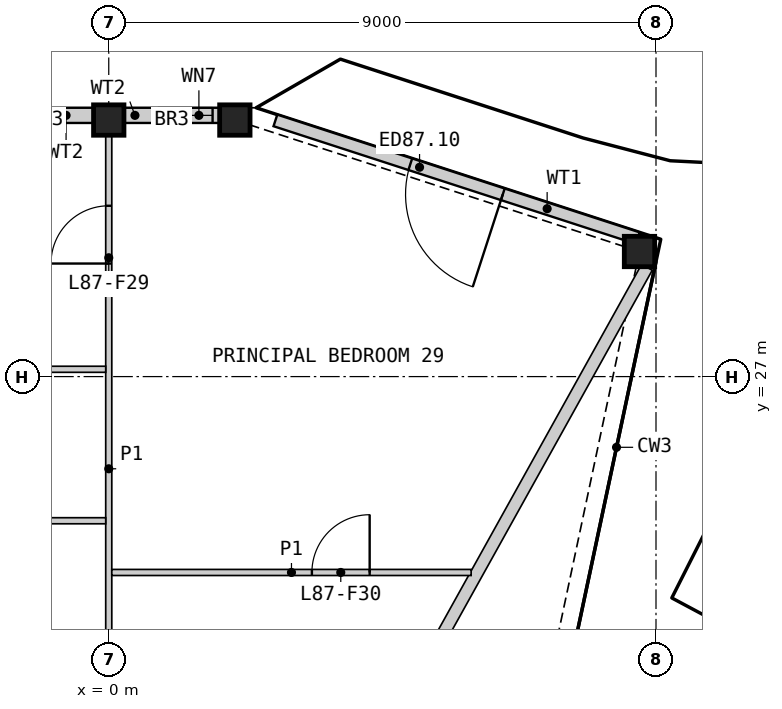
"""IFC4 building model, lengths in metres.
Left out: names, types, materials, properties, quantities, classifications, styles, units other than length and angle.
Written with IfcOpenShell. Run it as: python <this file> out.ifc"""

import sys

from ifc_helpers import new_model, si_unit, direction, frame, frame_2d, origin, origin_2d, place, context, subcontext, project, spatial, rectangle, hollow_rectangle, extrude, element, fill, save


model = new_model("IFC4")
c1 = context("Model", 3, precision=1e-05, world=origin(), true_north=direction((0.0, 1.0)))
c2 = subcontext(c1, "Body", "Model", "MODEL_VIEW")
j1 = project(units=[si_unit("LENGTHUNIT", "METRE"), si_unit("PLANEANGLEUNIT", "RADIAN")], contexts=[c1])
p1 = place(None, origin())
s1 = spatial("IfcSite", under=j1, at=p1, CompositionType="ELEMENT")
p2 = place(p1, origin())
s2 = spatial("IfcBuilding", under=s1, at=p2, CompositionType="ELEMENT")
p3 = place(p2, frame((0.0, 0.0, 384.8)))
s3 = spatial("IfcBuildingStorey", under=s2, at=p3, CompositionType="ELEMENT", Elevation=384.8)
for number, where, z_axis, x_axis in (
    (1, (8.729, 29.057, 0.0), (0.0, 0.0, 1.0), (1.0, 0.0, 0.0)),
    (2, (2.074, 31.219, 0.0), (0.0, 0.0, 1.0), (1.0, 0.0, 0.0)),
    (3, (0.0, 31.219, 0.0), (0.0, 0.0, 1.0), (1.0, 0.0, 0.0)),
):
    element("IfcColumn", number, at=place(p3, frame(where, z_axis=z_axis, x_axis=x_axis)), inside=s3, PredefinedType="COLUMN", context=c2, shape_type="SweptSolid", body=[
        extrude(hollow_rectangle(XDim=0.5, YDim=0.5, WallThickness=0.03, at=origin_2d()), origin(), (0.0, 0.0, 1.0), 3.4),
    ])
p4 = place(p3, frame((8.699, 29.277, 0.0), z_axis=(0.0, 0.0, 1.0), x_axis=(-0.951048671744, 0.309041136379, 0.0)))
e4 = element("IfcWall", 4, at=p4, inside=s3, PredefinedType="SOLIDWALL", context=c2, shape_type="SweptSolid", body=[
    extrude(rectangle(XDim=6.265, YDim=0.2, at=frame_2d((3.133, 0.0))), origin(), (0.0, 0.0, 1.0), 2.634),
])
p5 = place(p4, frame((2.333, 0.0, 0.0)))
e5 = element("IfcOpeningElement", 5, at=p5, cuts=e4, PredefinedType="OPENING", context=c2, shape_type="SweptSolid", body=[
    extrude(rectangle(XDim=1.6, YDim=2.25, at=frame_2d((0.8, 1.125))), frame((0.0, 0.11, 0.0), z_axis=(0.0, -1.0, 0.0), x_axis=(1.0, 0.0, 0.0)), (0.0, 0.0, 1.0), 0.22),
])
p6 = place(p3, frame((2.058, 31.296, 0.0), z_axis=(0.0, 0.0, 1.0), x_axis=(-1.0, 0.0, 0.0)))
e6 = element("IfcWall", 6, at=p6, inside=s3, PredefinedType="SOLIDWALL", context=c2, shape_type="SweptSolid", body=[
    extrude(rectangle(XDim=1.808, YDim=0.25, at=frame_2d((0.904, 0.0))), origin(), (0.0, 0.0, 1.0), 2.634),
])
p7 = place(p6, frame((0.35, 0.0, 1.8)))
e7 = element("IfcOpeningElement", 7, at=p7, cuts=e6, PredefinedType="OPENING", context=c2, shape_type="SweptSolid", body=[
    extrude(rectangle(XDim=0.9, YDim=0.6, at=frame_2d((0.45, 0.3))), frame((0.0, 0.135, 0.0), z_axis=(0.0, -1.0, 0.0), x_axis=(1.0, 0.0, 0.0)), (0.0, 0.0, 1.0), 0.27),
])
p8 = place(p3, frame((-0.25, 31.296, 0.0), z_axis=(0.0, 0.0, 1.0), x_axis=(-1.0, 0.0, 0.0)))
e8 = element("IfcWall", 8, at=p8, inside=s3, PredefinedType="SOLIDWALL", context=c2, shape_type="SweptSolid", body=[
    extrude(rectangle(XDim=1.808, YDim=0.25, at=frame_2d((0.904, 0.0))), origin(), (0.0, 0.0, 1.0), 2.634),
])
p9 = place(p3, frame((2.012, 16.498, 0.0), z_axis=(0.0, 0.0, 1.0), x_axis=(0.485991996179, 0.873963259897, 0.0)))
e9 = element("IfcWall", 9, at=p9, inside=s3, PredefinedType="PARTITIONING", context=c2, shape_type="SweptSolid", body=[
    extrude(rectangle(XDim=14.073, YDim=0.2, at=frame_2d((7.036, 0.0))), origin(), (0.0, 0.0, 1.0), 2.33),
])
p10 = place(p3, frame((0.0, 20.008, 0.0), z_axis=(0.0, 0.0, 1.0), x_axis=(0.0, 1.0, 0.0)))
e10 = element("IfcWall", 10, at=p10, inside=s3, PredefinedType="PARTITIONING", context=c2, shape_type="SweptSolid", body=[
    extrude(rectangle(XDim=10.951, YDim=0.1, at=frame_2d((5.476, 0.0))), origin(), (0.0, 0.0, 1.0), 2.33),
])
p11 = place(p10, frame((8.851, 0.0, 0.0)))
e11 = element("IfcOpeningElement", 11, at=p11, cuts=e10, PredefinedType="OPENING", context=c2, shape_type="SweptSolid", body=[
    extrude(rectangle(XDim=0.95, YDim=2.1, at=frame_2d((0.475, 1.05))), frame((0.0, 0.06, 0.0), z_axis=(0.0, -1.0, 0.0), x_axis=(1.0, 0.0, 0.0)), (0.0, 0.0, 1.0), 0.12),
])
p12 = place(p3, frame((-7.793, 27.12, 0.0), z_axis=(0.0, 0.0, 1.0), x_axis=(1.0, 0.0, 0.0)))
e12 = element("IfcWall", 12, at=p12, inside=s3, PredefinedType="PARTITIONING", context=c2, shape_type="SweptSolid", body=[
    extrude(rectangle(XDim=7.743, YDim=0.1, at=frame_2d((3.872, 0.0))), origin(), (0.0, 0.0, 1.0), 2.33),
])
p13 = place(p12, frame((3.701, 0.0, 0.0)))
e13 = element("IfcOpeningElement", 13, at=p13, cuts=e12, PredefinedType="OPENING", context=c2, shape_type="SweptSolid", body=[
    extrude(rectangle(XDim=0.95, YDim=2.1, at=frame_2d((0.475, 1.05))), frame((0.0, 0.06, 0.0), z_axis=(0.0, -1.0, 0.0), x_axis=(1.0, 0.0, 0.0)), (0.0, 0.0, 1.0), 0.12),
])
p14 = place(p3, frame((-6.408, 24.629, 0.0), z_axis=(0.0, 0.0, 1.0), x_axis=(1.0, 0.0, 0.0)))
e14 = element("IfcWall", 14, at=p14, inside=s3, PredefinedType="PARTITIONING", context=c2, shape_type="SweptSolid", body=[
    extrude(rectangle(XDim=6.358, YDim=0.1, at=frame_2d((3.179, 0.0))), origin(), (0.0, 0.0, 1.0), 2.33),
])
p15 = place(p14, frame((3.455, 0.0, 0.0)))
e15 = element("IfcOpeningElement", 15, at=p15, cuts=e14, PredefinedType="OPENING", context=c2, shape_type="SweptSolid", body=[
    extrude(rectangle(XDim=0.95, YDim=2.1, at=frame_2d((0.475, 1.05))), frame((0.0, 0.06, 0.0), z_axis=(0.0, -1.0, 0.0), x_axis=(1.0, 0.0, 0.0)), (0.0, 0.0, 1.0), 0.12),
])
p16 = place(p3, frame((0.05, 23.778, 0.0), z_axis=(0.0, 0.0, 1.0), x_axis=(1.0, 0.0, 0.0)))
e16 = element("IfcWall", 16, at=p16, inside=s3, PredefinedType="PARTITIONING", context=c2, shape_type="SweptSolid", body=[
    extrude(rectangle(XDim=5.91, YDim=0.1, at=frame_2d((2.955, 0.0))), origin(), (0.0, 0.0, 1.0), 2.33),
])
p17 = place(p16, frame((3.291, 0.0, 0.0)))
e17 = element("IfcOpeningElement", 17, at=p17, cuts=e16, PredefinedType="OPENING", context=c2, shape_type="SweptSolid", body=[
    extrude(rectangle(XDim=0.95, YDim=2.1, at=frame_2d((0.475, 1.05))), frame((0.0, 0.06, 0.0), z_axis=(0.0, -1.0, 0.0), x_axis=(1.0, 0.0, 0.0)), (0.0, 0.0, 1.0), 0.12),
])
p18 = place(p5, origin())
e18 = element("IfcDoor", 18, at=p18, inside=s3, OperationType="DOUBLE_DOOR_SINGLE_SWING", PredefinedType="DOOR", context=c2, shape_type="SweptSolid", body=[
    extrude(rectangle(XDim=1.6, YDim=2.25, at=frame_2d((0.8, 1.125))), frame((0.0, 0.025, 0.0), z_axis=(0.0, -1.0, 0.0), x_axis=(1.0, 0.0, 0.0)), (0.0, 0.0, 1.0), 0.05),
])
fill(e5, e18)
p19 = place(p7, origin())
e19 = element("IfcWindow", 19, at=p19, inside=s3, PartitioningType="SINGLE_PANEL", PredefinedType="WINDOW", context=c2, shape_type="SweptSolid", body=[
    extrude(rectangle(XDim=0.9, YDim=0.6, at=frame_2d((0.45, 0.3))), frame((0.0, 0.03, 0.0), z_axis=(0.0, -1.0, 0.0), x_axis=(1.0, 0.0, 0.0)), (0.0, 0.0, 1.0), 0.06),
])
fill(e7, e19)
p20 = place(p11, origin())
e20 = element("IfcDoor", 20, at=p20, inside=s3, OperationType="SINGLE_SWING_LEFT", PredefinedType="DOOR", context=c2, shape_type="SweptSolid", body=[
    extrude(rectangle(XDim=0.95, YDim=2.1, at=frame_2d((0.475, 1.05))), frame((0.0, 0.025, 0.0), z_axis=(0.0, -1.0, 0.0), x_axis=(1.0, 0.0, 0.0)), (0.0, 0.0, 1.0), 0.05),
])
fill(e11, e20)
p21 = place(p17, origin())
e21 = element("IfcDoor", 21, at=p21, inside=s3, OperationType="SINGLE_SWING_RIGHT", PredefinedType="DOOR", context=c2, shape_type="SweptSolid", body=[
    extrude(rectangle(XDim=0.95, YDim=2.1, at=frame_2d((0.475, 1.05))), frame((0.0, 0.025, 0.0), z_axis=(0.0, -1.0, 0.0), x_axis=(1.0, 0.0, 0.0)), (0.0, 0.0, 1.0), 0.05),
])
fill(e17, e21)
save(model, sys.argv[1])
